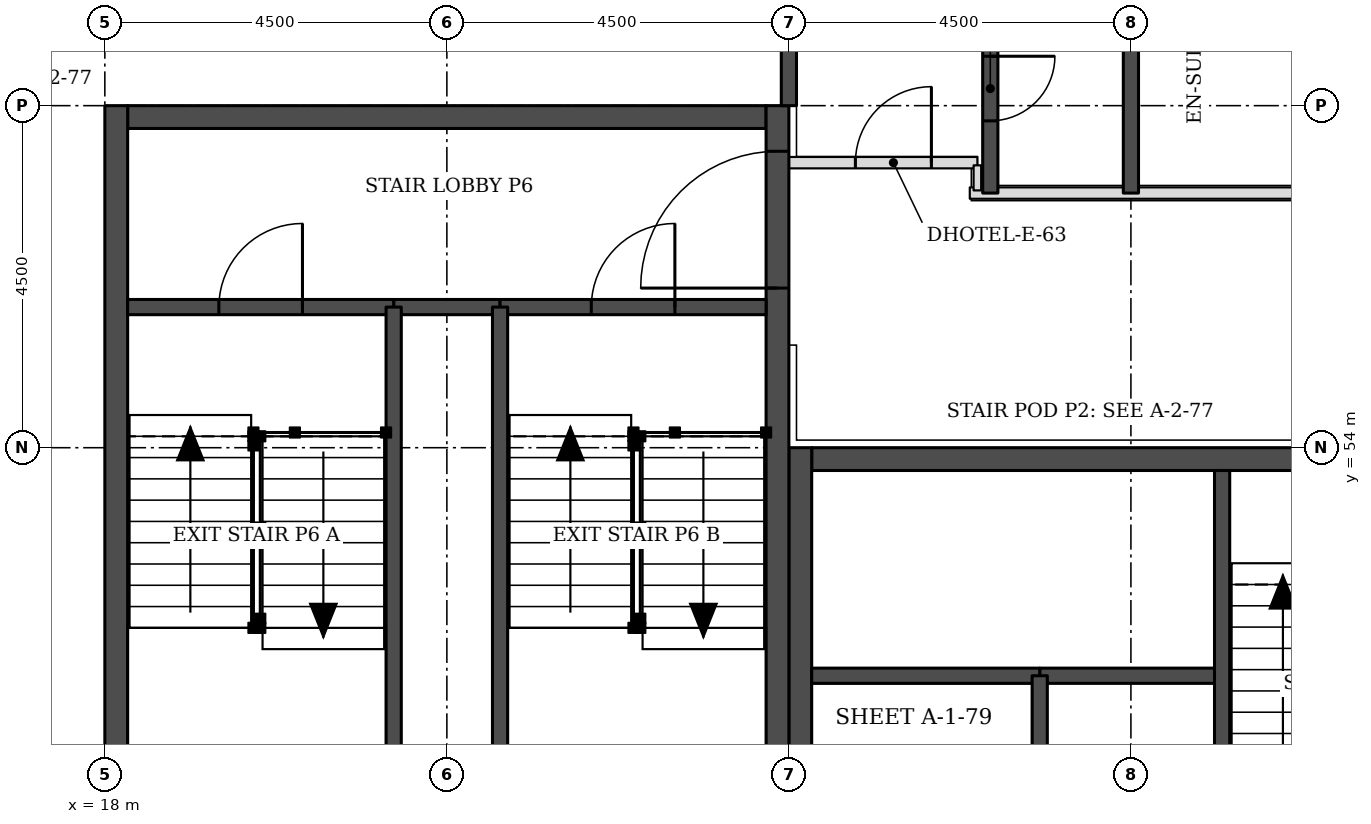
"""IFC4 building model, lengths in metres.
Left out: names, types, materials, properties, quantities, classifications, styles, units other than length and angle.
Written with IfcOpenShell. Run it as: python <this file> out.ifc"""

import sys

from ifc_helpers import new_model, si_unit, direction, frame, frame_2d, origin, place, context, subcontext, project, spatial, rectangle, extrude, element, fill, save


model = new_model("IFC4")
c1 = context("Model", 3, precision=1e-05, world=origin(), true_north=direction((0.0, 1.0)))
c2 = subcontext(c1, "Body", "Model", "MODEL_VIEW")
j1 = project(units=[si_unit("LENGTHUNIT", "METRE"), si_unit("PLANEANGLEUNIT", "RADIAN")], contexts=[c1])
p1 = place(None, origin())
s1 = spatial("IfcSite", under=j1, at=p1, CompositionType="ELEMENT")
p2 = place(p1, origin())
s2 = spatial("IfcBuilding", under=s1, at=p2, CompositionType="ELEMENT")
p3 = place(p2, frame((0.0, 0.0, 39.6)))
s3 = spatial("IfcBuildingStorey", under=s2, at=p3, CompositionType="ELEMENT", Elevation=39.6)
p4 = place(p3, frame((27.3, 53.85, 0.0), z_axis=(0.0, 0.0, 1.0), x_axis=(1.0, 0.0, 0.0)))
e1 = element("IfcWall", 1, at=p4, inside=s3, PredefinedType="SHEAR", context=c2, shape_type="SweptSolid", body=[
    extrude(rectangle(XDim=8.4, YDim=0.3, at=frame_2d((4.2, 0.0))), origin(), (0.0, 0.0, 1.0), 3.3),
])
p5 = place(p4, frame((6.4, 0.0, 0.0)))
e2 = element("IfcOpeningElement", 2, at=p5, cuts=e1, PredefinedType="OPENING", context=c2, shape_type="SweptSolid", body=[
    extrude(rectangle(XDim=1.1, YDim=2.1, at=frame_2d((0.55, 1.05))), frame((0.0, 0.16, 0.0), z_axis=(0.0, -1.0, 0.0), x_axis=(1.0, 0.0, 0.0)), (0.0, 0.0, 1.0), 0.32),
])
p6 = place(p3, frame((27.15, 45.0, 0.0), z_axis=(0.0, 0.0, 1.0), x_axis=(0.0, 1.0, 0.0)))
e3 = element("IfcWall", 3, at=p6, inside=s3, PredefinedType="SHEAR", context=c2, shape_type="SweptSolid", body=[
    extrude(rectangle(XDim=9.0, YDim=0.3, at=frame_2d((4.5, 0.0))), origin(), (0.0, 0.0, 1.0), 3.3),
])
p7 = place(p6, frame((0.4, 0.0, 0.0)))
e4 = element("IfcOpeningElement", 4, at=p7, cuts=e3, PredefinedType="OPENING", context=c2, shape_type="SweptSolid", body=[
    extrude(rectangle(XDim=1.1, YDim=2.1, at=frame_2d((0.55, 1.05))), frame((0.0, 0.16, 0.0), z_axis=(0.0, -1.0, 0.0), x_axis=(1.0, 0.0, 0.0)), (0.0, 0.0, 1.0), 0.32),
])
p8 = place(p3, frame((18.3, 58.35, 0.0), z_axis=(0.0, 0.0, 1.0), x_axis=(1.0, 0.0, 0.0)))
e5 = element("IfcWall", 5, at=p8, inside=s3, PredefinedType="SHEAR", context=c2, shape_type="SweptSolid", body=[
    extrude(rectangle(XDim=8.4, YDim=0.3, at=frame_2d((4.2, 0.0))), origin(), (0.0, 0.0, 1.0), 3.3),
])
p9 = place(p3, frame((18.15, 49.5, 0.0), z_axis=(0.0, 0.0, 1.0), x_axis=(0.0, 1.0, 0.0)))
e6 = element("IfcWall", 6, at=p9, inside=s3, PredefinedType="SHEAR", context=c2, shape_type="SweptSolid", body=[
    extrude(rectangle(XDim=9.0, YDim=0.3, at=frame_2d((4.5, 0.0))), origin(), (0.0, 0.0, 1.0), 3.3),
])
p10 = place(p3, frame((26.85, 49.5, 0.0), z_axis=(0.0, 0.0, 1.0), x_axis=(0.0, 1.0, 0.0)))
e7 = element("IfcWall", 7, at=p10, inside=s3, PredefinedType="SHEAR", context=c2, shape_type="SweptSolid", body=[
    extrude(rectangle(XDim=9.0, YDim=0.3, at=frame_2d((4.5, 0.0))), origin(), (0.0, 0.0, 1.0), 3.3),
])
p11 = place(p10, frame((6.6, 0.0, 0.0)))
e8 = element("IfcOpeningElement", 8, at=p11, cuts=e7, PredefinedType="OPENING", context=c2, shape_type="SweptSolid", body=[
    extrude(rectangle(XDim=1.8, YDim=2.1, at=frame_2d((0.9, 1.05))), frame((0.0, 0.16, 0.0), z_axis=(0.0, -1.0, 0.0), x_axis=(1.0, 0.0, 0.0)), (0.0, 0.0, 1.0), 0.32),
])
p12 = place(p3, frame((17.73, 63.826, 0.0), z_axis=(0.0, 0.0, 1.0), x_axis=(-0.707106781187, -0.707106781187, 0.0)))
e9 = element("IfcWall", 9, at=p12, inside=s3, PredefinedType="STANDARD", context=c2, shape_type="SweptSolid", body=[
    extrude(rectangle(XDim=7.151, YDim=0.35, at=frame_2d((3.576, 0.0))), origin(), (0.0, 0.0, 1.0), 3.055),
])
p13 = place(p12, frame((1.926, 0.0, 0.8)))
e10 = element("IfcOpeningElement", 10, at=p13, cuts=e9, PredefinedType="OPENING", context=c2, shape_type="SweptSolid", body=[
    extrude(rectangle(XDim=3.3, YDim=1.5, at=frame_2d((1.65, 0.75))), frame((0.0, 0.185, 0.0), z_axis=(0.0, -1.0, 0.0), x_axis=(1.0, 0.0, 0.0)), (0.0, 0.0, 1.0), 0.37),
])
p14 = place(p3, frame((29.38, 57.35, 0.0), z_axis=(0.0, 0.0, 1.0), x_axis=(1.0, 0.0, 0.0)))
e11 = element("IfcWall", 11, at=p14, inside=s3, PredefinedType="PARTITIONING", context=c2, shape_type="SweptSolid", body=[
    extrude(rectangle(XDim=13.62, YDim=0.15, at=frame_2d((6.81, 0.0))), origin(), (0.0, 0.0, 1.0), 3.08),
])
p15 = place(p14, frame((5.02, 0.0, 0.0)))
e12 = element("IfcOpeningElement", 12, at=p15, cuts=e11, PredefinedType="OPENING", context=c2, shape_type="SweptSolid", body=[
    extrude(rectangle(XDim=1.0, YDim=2.1, at=frame_2d((0.5, 1.05))), frame((0.0, 0.085, 0.0), z_axis=(0.0, -1.0, 0.0), x_axis=(1.0, 0.0, 0.0)), (0.0, 0.0, 1.0), 0.17),
])
p16 = place(p14, frame((9.67, 0.0, 0.0)))
e13 = element("IfcOpeningElement", 13, at=p16, cuts=e11, PredefinedType="OPENING", context=c2, shape_type="SweptSolid", body=[
    extrude(rectangle(XDim=0.9, YDim=2.1, at=frame_2d((0.45, 1.05))), frame((0.0, 0.085, 0.0), z_axis=(0.0, -1.0, 0.0), x_axis=(1.0, 0.0, 0.0)), (0.0, 0.0, 1.0), 0.17),
])
p17 = place(p3, frame((27.0, 58.5, 0.0), z_axis=(0.0, 0.0, 1.0), x_axis=(0.0, 1.0, 0.0)))
e14 = element("IfcWall", 14, at=p17, inside=s3, PredefinedType="SOLIDWALL", context=c2, shape_type="SweptSolid", body=[
    extrude(rectangle(XDim=3.9, YDim=0.2, at=frame_2d((1.95, 0.0))), origin(), (0.0, 0.0, 1.0), 3.08),
])
p18 = place(p3, frame((29.65, 57.35, 0.0), z_axis=(0.0, 0.0, 1.0), x_axis=(0.0, 1.0, 0.0)))
e15 = element("IfcWall", 15, at=p18, inside=s3, PredefinedType="SOLIDWALL", context=c2, shape_type="SweptSolid", body=[
    extrude(rectangle(XDim=2.75, YDim=0.2, at=frame_2d((1.375, 0.0))), origin(), (0.0, 0.0, 1.0), 3.08),
])
p19 = place(p18, frame((0.95, 0.0, 0.0)))
e16 = element("IfcOpeningElement", 16, at=p19, cuts=e15, PredefinedType="OPENING", context=c2, shape_type="SweptSolid", body=[
    extrude(rectangle(XDim=0.85, YDim=2.1, at=frame_2d((0.425, 1.05))), frame((0.0, 0.11, 0.0), z_axis=(0.0, -1.0, 0.0), x_axis=(1.0, 0.0, 0.0)), (0.0, 0.0, 1.0), 0.22),
])
p20 = place(p3, frame((31.5, 57.35, 0.0), z_axis=(0.0, 0.0, 1.0), x_axis=(0.0, 1.0, 0.0)))
e17 = element("IfcWall", 17, at=p20, inside=s3, PredefinedType="SOLIDWALL", context=c2, shape_type="SweptSolid", body=[
    extrude(rectangle(XDim=5.05, YDim=0.2, at=frame_2d((2.525, 0.0))), origin(), (0.0, 0.0, 1.0), 3.08),
])
p21 = place(p3, frame((27.0, 57.75, 0.0), z_axis=(0.0, 0.0, 1.0), x_axis=(1.0, 0.0, 0.0)))
e18 = element("IfcWall", 18, at=p21, inside=s3, PredefinedType="PARTITIONING", context=c2, shape_type="SweptSolid", body=[
    extrude(rectangle(XDim=2.48, YDim=0.15, at=frame_2d((1.24, 0.0))), origin(), (0.0, 0.0, 1.0), 3.08),
])
p22 = place(p21, frame((0.875, 0.0, 0.0)))
e19 = element("IfcOpeningElement", 19, at=p22, cuts=e18, PredefinedType="OPENING", context=c2, shape_type="SweptSolid", body=[
    extrude(rectangle(XDim=1.0, YDim=2.1, at=frame_2d((0.5, 1.05))), frame((0.0, 0.085, 0.0), z_axis=(0.0, -1.0, 0.0), x_axis=(1.0, 0.0, 0.0)), (0.0, 0.0, 1.0), 0.17),
])
p23 = place(p3, frame((29.48, 57.385, 0.0), z_axis=(0.0, 0.0, 1.0), x_axis=(0.0, 1.0, 0.0)))
e20 = element("IfcWall", 20, at=p23, inside=s3, PredefinedType="PARTITIONING", context=c2, shape_type="SweptSolid", body=[
    extrude(rectangle(XDim=0.33, YDim=0.1, at=frame_2d((0.165, 0.0))), origin(), (0.0, 0.0, 1.0), 3.08),
])
p24 = place(p3, frame((30.3, 51.0, 0.0), z_axis=(0.0, 0.0, 1.0), x_axis=(1.0, 0.0, 0.0)))
e21 = element("IfcWall", 21, at=p24, inside=s3, PredefinedType="SOLIDWALL", context=c2, shape_type="SweptSolid", body=[
    extrude(rectangle(XDim=2.4, YDim=0.2, at=frame_2d((1.2, 0.0))), origin(), (0.0, 0.0, 1.0), 3.3),
])
p25 = place(p3, frame((27.3, 51.0, 0.0), z_axis=(0.0, 0.0, 1.0), x_axis=(1.0, 0.0, 0.0)))
e22 = element("IfcWall", 22, at=p25, inside=s3, PredefinedType="SOLIDWALL", context=c2, shape_type="SweptSolid", body=[
    extrude(rectangle(XDim=3.0, YDim=0.2, at=frame_2d((1.5, 0.0))), origin(), (0.0, 0.0, 1.0), 3.08),
])
for number, where, z_axis, x_axis in (
    (23, (30.3, 45.3, 0.0), (0.0, 0.0, 1.0), (0.0, 1.0, 0.0)),
    (24, (32.7, 48.0, 0.0), (0.0, 0.0, 1.0), (0.0, 1.0, 0.0)),
):
    element("IfcWall", number, at=place(p3, frame(where, z_axis=z_axis, x_axis=x_axis)), inside=s3, PredefinedType="SOLIDWALL", context=c2, shape_type="SweptSolid", body=[
        extrude(rectangle(XDim=5.7, YDim=0.2, at=frame_2d((2.85, 0.0))), origin(), (0.0, 0.0, 1.0), 3.08),
    ])
p26 = place(p3, frame((21.8, 55.85, 0.0), z_axis=(0.0, 0.0, 1.0), x_axis=(1.0, 0.0, 0.0)))
e25 = element("IfcWall", 25, at=p26, inside=s3, PredefinedType="SOLIDWALL", context=c2, shape_type="SweptSolid", body=[
    extrude(rectangle(XDim=1.4, YDim=0.2, at=frame_2d((0.7, 0.0))), origin(), (0.0, 0.0, 1.0), 3.08),
])
p27 = place(p3, frame((18.3, 55.85, 0.0), z_axis=(0.0, 0.0, 1.0), x_axis=(1.0, 0.0, 0.0)))
e26 = element("IfcWall", 26, at=p27, inside=s3, PredefinedType="SOLIDWALL", context=c2, shape_type="SweptSolid", body=[
    extrude(rectangle(XDim=3.5, YDim=0.2, at=frame_2d((1.75, 0.0))), origin(), (0.0, 0.0, 1.0), 3.08),
])
p28 = place(p27, frame((1.2, 0.0, 0.0)))
e27 = element("IfcOpeningElement", 27, at=p28, cuts=e26, PredefinedType="OPENING", context=c2, shape_type="SweptSolid", body=[
    extrude(rectangle(XDim=1.1, YDim=2.1, at=frame_2d((0.55, 1.05))), frame((0.0, 0.11, 0.0), z_axis=(0.0, -1.0, 0.0), x_axis=(1.0, 0.0, 0.0)), (0.0, 0.0, 1.0), 0.22),
])
p29 = place(p3, frame((23.2, 55.85, 0.0), z_axis=(0.0, 0.0, 1.0), x_axis=(1.0, 0.0, 0.0)))
e28 = element("IfcWall", 28, at=p29, inside=s3, PredefinedType="SOLIDWALL", context=c2, shape_type="SweptSolid", body=[
    extrude(rectangle(XDim=3.5, YDim=0.2, at=frame_2d((1.75, 0.0))), origin(), (0.0, 0.0, 1.0), 3.08),
])
p30 = place(p29, frame((1.2, 0.0, 0.0)))
e29 = element("IfcOpeningElement", 29, at=p30, cuts=e28, PredefinedType="OPENING", context=c2, shape_type="SweptSolid", body=[
    extrude(rectangle(XDim=1.1, YDim=2.1, at=frame_2d((0.55, 1.05))), frame((0.0, 0.11, 0.0), z_axis=(0.0, -1.0, 0.0), x_axis=(1.0, 0.0, 0.0)), (0.0, 0.0, 1.0), 0.22),
])
for number, where, z_axis, x_axis in (
    (30, (21.8, 49.8, 0.0), (0.0, 0.0, 1.0), (0.0, 1.0, 0.0)),
    (31, (23.2, 49.8, 0.0), (0.0, 0.0, 1.0), (0.0, 1.0, 0.0)),
):
    element("IfcWall", number, at=place(p3, frame(where, z_axis=z_axis, x_axis=x_axis)), inside=s3, PredefinedType="SOLIDWALL", context=c2, shape_type="SweptSolid", body=[
        extrude(rectangle(XDim=6.05, YDim=0.2, at=frame_2d((3.025, 0.0))), origin(), (0.0, 0.0, 1.0), 3.08),
    ])
p31 = place(p19, frame((0.85, 0.0, 0.0), z_axis=(0.0, 0.0, 1.0), x_axis=(-1.0, 0.0, 0.0)))
e32 = element("IfcDoor", 32, at=p31, inside=s3, OperationType="SINGLE_SWING_LEFT", PredefinedType="DOOR", context=c2, shape_type="SweptSolid", body=[
    extrude(rectangle(XDim=0.85, YDim=2.1, at=frame_2d((0.425, 1.05))), frame((0.0, 0.025, 0.0), z_axis=(0.0, -1.0, 0.0), x_axis=(1.0, 0.0, 0.0)), (0.0, 0.0, 1.0), 0.05),
])
fill(e16, e32)
p32 = place(p22, origin())
e33 = element("IfcDoor", 33, at=p32, inside=s3, OperationType="SINGLE_SWING_RIGHT", PredefinedType="DOOR", context=c2, shape_type="SweptSolid", body=[
    extrude(rectangle(XDim=1.0, YDim=2.1, at=frame_2d((0.5, 1.05))), frame((0.0, 0.025, 0.0), z_axis=(0.0, -1.0, 0.0), x_axis=(1.0, 0.0, 0.0)), (0.0, 0.0, 1.0), 0.05),
])
fill(e19, e33)
p33 = place(p28, origin())
e34 = element("IfcDoor", 34, at=p33, inside=s3, OperationType="SINGLE_SWING_RIGHT", PredefinedType="DOOR", context=c2, shape_type="SweptSolid", body=[
    extrude(rectangle(XDim=1.1, YDim=2.1, at=frame_2d((0.55, 1.05))), frame((0.0, 0.025, 0.0), z_axis=(0.0, -1.0, 0.0), x_axis=(1.0, 0.0, 0.0)), (0.0, 0.0, 1.0), 0.05),
])
fill(e27, e34)
p34 = place(p30, origin())
e35 = element("IfcDoor", 35, at=p34, inside=s3, OperationType="SINGLE_SWING_RIGHT", PredefinedType="DOOR", context=c2, shape_type="SweptSolid", body=[
    extrude(rectangle(XDim=1.1, YDim=2.1, at=frame_2d((0.55, 1.05))), frame((0.0, 0.025, 0.0), z_axis=(0.0, -1.0, 0.0), x_axis=(1.0, 0.0, 0.0)), (0.0, 0.0, 1.0), 0.05),
])
fill(e29, e35)
p35 = place(p11, origin())
e36 = element("IfcDoor", 36, at=p35, inside=s3, OperationType="SINGLE_SWING_LEFT", PredefinedType="DOOR", context=c2, shape_type="SweptSolid", body=[
    extrude(rectangle(XDim=1.8, YDim=2.1, at=frame_2d((0.9, 1.05))), frame((0.0, 0.025, 0.0), z_axis=(0.0, -1.0, 0.0), x_axis=(1.0, 0.0, 0.0)), (0.0, 0.0, 1.0), 0.05),
])
fill(e8, e36)
save(model, sys.argv[1])
